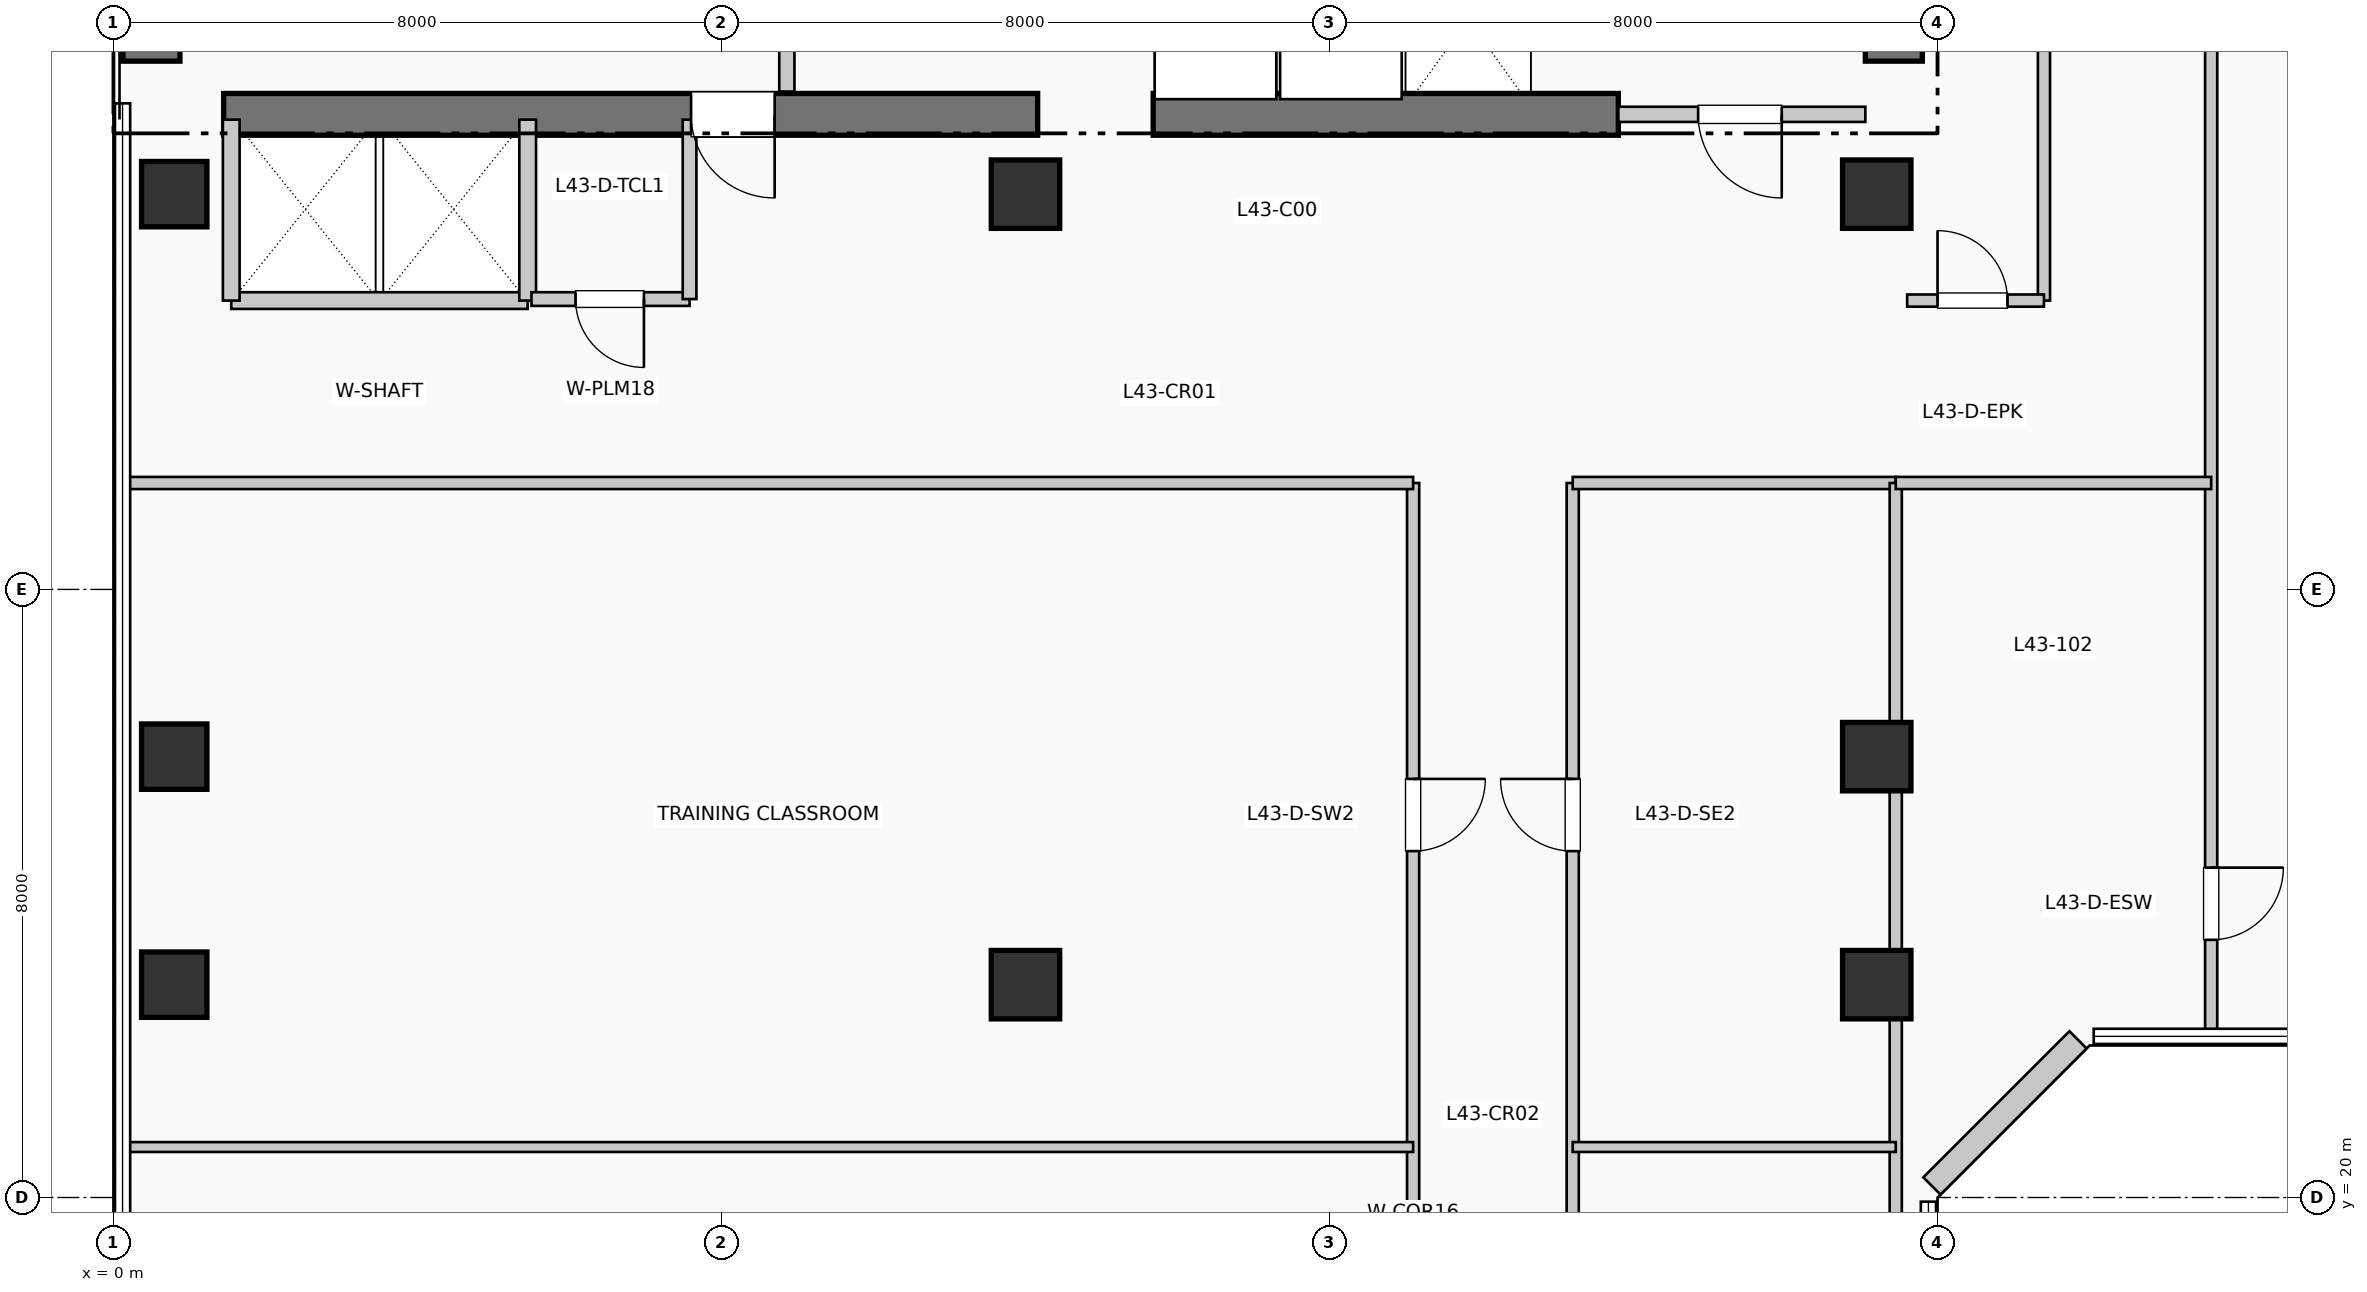
"""IFC4 building model, lengths in metres.
Left out: names, types, materials, properties, quantities, classifications, styles, units other than length and angle.
Written with IfcOpenShell. Run it as: python <this file> out.ifc"""

import sys

from ifc_helpers import new_model, si_unit, direction, frame, frame_2d, origin, origin_2d, place, context, subcontext, project, spatial, rectangle, extrude, element, fill, save


model = new_model("IFC4")
c1 = context("Model", 3, precision=1e-05, world=origin(), true_north=direction((0.0, 1.0)))
c2 = subcontext(c1, "Body", "Model", "MODEL_VIEW")
j1 = project(units=[si_unit("LENGTHUNIT", "METRE"), si_unit("PLANEANGLEUNIT", "RADIAN")], contexts=[c1])
p1 = place(None, origin())
s1 = spatial("IfcSite", under=j1, at=p1, CompositionType="ELEMENT")
p2 = place(p1, origin())
s2 = spatial("IfcBuilding", under=s1, at=p2, CompositionType="ELEMENT")
p3 = place(p2, frame((0.0, 0.0, 179.52)))
s3 = spatial("IfcBuildingStorey", under=s2, at=p3, CompositionType="ELEMENT", Elevation=179.52)
p4 = place(p3, frame((0.5, 34.95, 0.0), z_axis=(0.0, 0.0, 1.0), x_axis=(0.0, 1.0, 0.0)))
e1 = element("IfcWall", 1, at=p4, inside=s3, PredefinedType="SHEAR", context=c2, shape_type="SweptSolid", body=[
    extrude(rectangle(XDim=7.9, YDim=0.75, at=frame_2d((3.95, 0.0))), origin(), (0.0, 0.0, 1.0), 3.96),
])
p5 = place(p3, frame((23.425, 34.95, 0.0), z_axis=(0.0, 0.0, 1.0), x_axis=(0.0, 1.0, 0.0)))
e2 = element("IfcWall", 2, at=p5, inside=s3, PredefinedType="SHEAR", context=c2, shape_type="SweptSolid", body=[
    extrude(rectangle(XDim=10.64, YDim=0.75, at=frame_2d((5.32, 0.0))), origin(), (0.0, 0.0, 1.0), 3.96),
])
p6 = place(p3, frame((1.45, 34.25, 0.0), z_axis=(0.0, 0.0, 1.0), x_axis=(1.0, 0.0, 0.0)))
e3 = element("IfcWall", 3, at=p6, inside=s3, PredefinedType="SHEAR", context=c2, shape_type="SweptSolid", body=[
    extrude(rectangle(XDim=10.71, YDim=0.55, at=frame_2d((5.355, 0.0))), origin(), (0.0, 0.0, 1.0), 3.96),
])
p7 = place(p6, frame((7.25, 0.0, 0.0), z_axis=(0.0, 0.0, 1.0), x_axis=(-1.0, 0.0, 0.0)))
e4 = element("IfcOpeningElement", 4, at=p7, cuts=e3, PredefinedType="OPENING", context=c2, shape_type="SweptSolid", body=[
    extrude(rectangle(XDim=1.1, YDim=2.15, at=frame_2d((0.55, 1.075))), frame((0.0, 0.285, 0.0), z_axis=(0.0, -1.0, 0.0), x_axis=(1.0, 0.0, 0.0)), (0.0, 0.0, 1.0), 0.57),
])
p8 = place(p3, frame((13.68, 34.25, 0.0), z_axis=(0.0, 0.0, 1.0), x_axis=(1.0, 0.0, 0.0)))
e5 = element("IfcWall", 5, at=p8, inside=s3, PredefinedType="SHEAR", context=c2, shape_type="SweptSolid", body=[
    extrude(rectangle(XDim=6.12, YDim=0.55, at=frame_2d((3.06, 0.0))), origin(), (0.0, 0.0, 1.0), 3.96),
])
for number, where, z_axis, x_axis in (
    (6, (0.8, 22.8, 0.0), (0.0, 0.0, 1.0), (1.0, 0.0, 0.0)),
    (7, (0.8, 25.8, 0.0), (0.0, 0.0, 1.0), (1.0, 0.0, 0.0)),
    (8, (0.8, 33.2, 0.0), (0.0, 0.0, 1.0), (1.0, 0.0, 0.0)),
):
    element("IfcColumn", number, at=place(p3, frame(where, z_axis=z_axis, x_axis=x_axis)), inside=s3, PredefinedType="COLUMN", context=c2, shape_type="SweptSolid", body=[
        extrude(rectangle(XDim=0.86, YDim=0.86, at=origin_2d()), origin(), (0.0, 0.0, 1.0), 3.96),
    ])
for number, where, z_axis, x_axis in (
    (9, (12.0, 22.8, 0.0), (0.0, 0.0, 1.0), (1.0, 0.0, 0.0)),
    (10, (12.0, 33.2, 0.0), (0.0, 0.0, 1.0), (1.0, 0.0, 0.0)),
    (11, (23.2, 22.8, 0.0), (0.0, 0.0, 1.0), (1.0, 0.0, 0.0)),
    (12, (23.2, 25.8, 0.0), (0.0, 0.0, 1.0), (1.0, 0.0, 0.0)),
    (13, (23.2, 33.2, 0.0), (0.0, 0.0, 1.0), (1.0, 0.0, 0.0)),
):
    element("IfcColumn", number, at=place(p3, frame(where, z_axis=z_axis, x_axis=x_axis)), inside=s3, PredefinedType="COLUMN", context=c2, shape_type="SweptSolid", body=[
        extrude(rectangle(XDim=0.9, YDim=0.9, at=origin_2d()), origin(), (0.0, 0.0, 1.0), 3.96),
    ])
p9 = place(p3, frame((23.926, 20.152, 0.0), z_axis=(0.0, 0.0, 1.0), x_axis=(0.707106781187, 0.707106781187, 0.0)))
e14 = element("IfcWall", 14, at=p9, inside=s3, PredefinedType="SOLIDWALL", context=c2, shape_type="SweptSolid", body=[
    extrude(rectangle(XDim=2.718, YDim=0.32, at=frame_2d((1.359, 0.0))), origin(), (0.0, 0.0, 1.0), 3.71),
])
p10 = place(p3, frame((8.86, 34.55, 0.0), z_axis=(0.0, 0.0, 1.0), x_axis=(0.0, 1.0, 0.0)))
e15 = element("IfcWall", 15, at=p10, inside=s3, PredefinedType="PARTITIONING", context=c2, shape_type="SweptSolid", body=[
    extrude(rectangle(XDim=2.5, YDim=0.2, at=frame_2d((1.25, 0.0))), origin(), (0.0, 0.0, 1.0), 3.71),
])
p11 = place(p3, frame((19.8, 34.25, 0.0), z_axis=(0.0, 0.0, 1.0), x_axis=(1.0, 0.0, 0.0)))
e16 = element("IfcWall", 16, at=p11, inside=s3, PredefinedType="PARTITIONING", context=c2, shape_type="SweptSolid", body=[
    extrude(rectangle(XDim=3.25, YDim=0.2, at=frame_2d((1.625, 0.0))), origin(), (0.0, 0.0, 1.0), 3.71),
])
p12 = place(p11, frame((2.15, 0.0, 0.0), z_axis=(0.0, 0.0, 1.0), x_axis=(-1.0, 0.0, 0.0)))
e17 = element("IfcOpeningElement", 17, at=p12, cuts=e16, PredefinedType="OPENING", context=c2, shape_type="SweptSolid", body=[
    extrude(rectangle(XDim=1.1, YDim=2.15, at=frame_2d((0.55, 1.075))), frame((0.0, 0.11, 0.0), z_axis=(0.0, -1.0, 0.0), x_axis=(1.0, 0.0, 0.0)), (0.0, 0.0, 1.0), 0.22),
])
p13 = place(p3, frame((1.55, 31.8, 0.0), z_axis=(0.0, 0.0, 1.0), x_axis=(1.0, 0.0, 0.0)))
e18 = element("IfcWall", 18, at=p13, inside=s3, PredefinedType="PARTITIONING", context=c2, shape_type="SweptSolid", body=[
    extrude(rectangle(XDim=3.9, YDim=0.22, at=frame_2d((1.95, 0.0))), origin(), (0.0, 0.0, 1.0), 3.71),
])
for number, where, z_axis, x_axis in (
    (19, (1.55, 31.8, 0.0), (0.0, 0.0, 1.0), (0.0, 1.0, 0.0)),
    (20, (5.45, 31.8, 0.0), (0.0, 0.0, 1.0), (0.0, 1.0, 0.0)),
):
    element("IfcWall", number, at=place(p3, frame(where, z_axis=z_axis, x_axis=x_axis)), inside=s3, PredefinedType="PARTITIONING", context=c2, shape_type="SweptSolid", body=[
        extrude(rectangle(XDim=2.38, YDim=0.22, at=frame_2d((1.19, 0.0))), origin(), (0.0, 0.0, 1.0), 3.71),
    ])
p14 = place(p3, frame((5.5, 31.82, 0.0), z_axis=(0.0, 0.0, 1.0), x_axis=(1.0, 0.0, 0.0)))
e21 = element("IfcWall", 21, at=p14, inside=s3, PredefinedType="PLUMBINGWALL", context=c2, shape_type="SweptSolid", body=[
    extrude(rectangle(XDim=2.08, YDim=0.18, at=frame_2d((1.04, 0.0))), origin(), (0.0, 0.0, 1.0), 3.71),
])
p15 = place(p14, frame((1.48, 0.0, 0.0), z_axis=(0.0, 0.0, 1.0), x_axis=(-1.0, 0.0, 0.0)))
e22 = element("IfcOpeningElement", 22, at=p15, cuts=e21, PredefinedType="OPENING", context=c2, shape_type="SweptSolid", body=[
    extrude(rectangle(XDim=0.9, YDim=2.1, at=frame_2d((0.45, 1.05))), frame((0.0, 0.1, 0.0), z_axis=(0.0, -1.0, 0.0), x_axis=(1.0, 0.0, 0.0)), (0.0, 0.0, 1.0), 0.2),
])
p16 = place(p3, frame((7.58, 31.82, 0.0), z_axis=(0.0, 0.0, 1.0), x_axis=(0.0, 1.0, 0.0)))
e23 = element("IfcWall", 23, at=p16, inside=s3, PredefinedType="PLUMBINGWALL", context=c2, shape_type="SweptSolid", body=[
    extrude(rectangle(XDim=2.36, YDim=0.18, at=frame_2d((1.18, 0.0))), origin(), (0.0, 0.0, 1.0), 3.71),
])
p17 = place(p3, frame((17.1, 12.6, 0.0), z_axis=(0.0, 0.0, 1.0), x_axis=(0.0, 1.0, 0.0)))
e24 = element("IfcWall", 24, at=p17, inside=s3, PredefinedType="PARTITIONING", context=c2, shape_type="SweptSolid", body=[
    extrude(rectangle(XDim=16.8, YDim=0.16, at=frame_2d((8.4, 0.0))), origin(), (0.0, 0.0, 1.0), 3.71),
])
p18 = place(p17, frame((4.507, 0.0, 0.0), z_axis=(0.0, 0.0, 1.0), x_axis=(-1.0, 0.0, 0.0)))
e25 = element("IfcOpeningElement", 25, at=p18, cuts=e24, PredefinedType="OPENING", context=c2, shape_type="SweptSolid", body=[
    extrude(rectangle(XDim=0.95, YDim=2.15, at=frame_2d((0.475, 1.075))), frame((0.0, 0.09, 0.0), z_axis=(0.0, -1.0, 0.0), x_axis=(1.0, 0.0, 0.0)), (0.0, 0.0, 1.0), 0.18),
])
p19 = place(p17, frame((12.907, 0.0, 0.0), z_axis=(0.0, 0.0, 1.0), x_axis=(-1.0, 0.0, 0.0)))
e26 = element("IfcOpeningElement", 26, at=p19, cuts=e24, PredefinedType="OPENING", context=c2, shape_type="SweptSolid", body=[
    extrude(rectangle(XDim=0.95, YDim=2.15, at=frame_2d((0.475, 1.075))), frame((0.0, 0.09, 0.0), z_axis=(0.0, -1.0, 0.0), x_axis=(1.0, 0.0, 0.0)), (0.0, 0.0, 1.0), 0.18),
])
p20 = place(p3, frame((19.2, 12.6, 0.0), z_axis=(0.0, 0.0, 1.0), x_axis=(0.0, 1.0, 0.0)))
e27 = element("IfcWall", 27, at=p20, inside=s3, PredefinedType="PARTITIONING", context=c2, shape_type="SweptSolid", body=[
    extrude(rectangle(XDim=16.8, YDim=0.16, at=frame_2d((8.4, 0.0))), origin(), (0.0, 0.0, 1.0), 3.71),
])
p21 = place(p20, frame((3.557, 0.0, 0.0)))
e28 = element("IfcOpeningElement", 28, at=p21, cuts=e27, PredefinedType="OPENING", context=c2, shape_type="SweptSolid", body=[
    extrude(rectangle(XDim=0.95, YDim=2.15, at=frame_2d((0.475, 1.075))), frame((0.0, 0.09, 0.0), z_axis=(0.0, -1.0, 0.0), x_axis=(1.0, 0.0, 0.0)), (0.0, 0.0, 1.0), 0.18),
])
p22 = place(p20, frame((11.957, 0.0, 0.0)))
e29 = element("IfcOpeningElement", 29, at=p22, cuts=e27, PredefinedType="OPENING", context=c2, shape_type="SweptSolid", body=[
    extrude(rectangle(XDim=0.95, YDim=2.15, at=frame_2d((0.475, 1.075))), frame((0.0, 0.09, 0.0), z_axis=(0.0, -1.0, 0.0), x_axis=(1.0, 0.0, 0.0)), (0.0, 0.0, 1.0), 0.18),
])
p23 = place(p3, frame((0.19, 29.4, 0.0), z_axis=(0.0, 0.0, 1.0), x_axis=(1.0, 0.0, 0.0)))
e30 = element("IfcWall", 30, at=p23, inside=s3, PredefinedType="PARTITIONING", context=c2, shape_type="SweptSolid", body=[
    extrude(rectangle(XDim=16.91, YDim=0.16, at=frame_2d((8.455, 0.0))), origin(), (0.0, 0.0, 1.0), 3.365),
])
p24 = place(p3, frame((19.2, 29.4, 0.0), z_axis=(0.0, 0.0, 1.0), x_axis=(1.0, 0.0, 0.0)))
e31 = element("IfcWall", 31, at=p24, inside=s3, PredefinedType="PARTITIONING", context=c2, shape_type="SweptSolid", body=[
    extrude(rectangle(XDim=4.25, YDim=0.16, at=frame_2d((2.125, 0.0))), origin(), (0.0, 0.0, 1.0), 3.71),
])
p25 = place(p3, frame((23.45, 0.19, 0.0), z_axis=(0.0, 0.0, 1.0), x_axis=(0.0, 1.0, 0.0)))
e32 = element("IfcWall", 32, at=p25, inside=s3, PredefinedType="PARTITIONING", context=c2, shape_type="SweptSolid", body=[
    extrude(rectangle(XDim=29.21, YDim=0.16, at=frame_2d((14.605, 0.0))), origin(), (0.0, 0.0, 1.0), 3.045),
])
p26 = place(p3, frame((0.19, 20.664, 0.0), z_axis=(0.0, 0.0, 1.0), x_axis=(1.0, 0.0, 0.0)))
e33 = element("IfcWall", 33, at=p26, inside=s3, PredefinedType="PARTITIONING", context=c2, shape_type="SweptSolid", body=[
    extrude(rectangle(XDim=16.91, YDim=0.13, at=frame_2d((8.455, 0.0))), origin(), (0.0, 0.0, 1.0), 3.71),
])
p27 = place(p3, frame((19.2, 20.664, 0.0), z_axis=(0.0, 0.0, 1.0), x_axis=(1.0, 0.0, 0.0)))
e34 = element("IfcWall", 34, at=p27, inside=s3, PredefinedType="PARTITIONING", context=c2, shape_type="SweptSolid", body=[
    extrude(rectangle(XDim=4.25, YDim=0.13, at=frame_2d((2.125, 0.0))), origin(), (0.0, 0.0, 1.0), 3.71),
])
p28 = place(p3, frame((25.4, 31.8, 0.0), z_axis=(0.0, 0.0, 1.0), x_axis=(0.0, 1.0, 0.0)))
e35 = element("IfcWall", 35, at=p28, inside=s3, PredefinedType="PARTITIONING", context=c2, shape_type="SweptSolid", body=[
    extrude(rectangle(XDim=14.01, YDim=0.16, at=frame_2d((7.005, 0.0))), origin(), (0.0, 0.0, 1.0), 3.71),
])
p29 = place(p3, frame((27.6, 22.19, 0.0), z_axis=(0.0, 0.0, 1.0), x_axis=(0.0, 1.0, 0.0)))
e36 = element("IfcWall", 36, at=p29, inside=s3, PredefinedType="PARTITIONING", context=c2, shape_type="SweptSolid", body=[
    extrude(rectangle(XDim=15.01, YDim=0.16, at=frame_2d((7.505, 0.0))), origin(), (0.0, 0.0, 1.0), 3.71),
])
p30 = place(p29, frame((2.15, 0.0, 0.0), z_axis=(0.0, 0.0, 1.0), x_axis=(-1.0, 0.0, 0.0)))
e37 = element("IfcOpeningElement", 37, at=p30, cuts=e36, PredefinedType="OPENING", context=c2, shape_type="SweptSolid", body=[
    extrude(rectangle(XDim=0.95, YDim=2.15, at=frame_2d((0.475, 1.075))), frame((0.0, 0.09, 0.0), z_axis=(0.0, -1.0, 0.0), x_axis=(1.0, 0.0, 0.0)), (0.0, 0.0, 1.0), 0.18),
])
p31 = place(p3, frame((23.45, 29.4, 0.0), z_axis=(0.0, 0.0, 1.0), x_axis=(1.0, 0.0, 0.0)))
e38 = element("IfcWall", 38, at=p31, inside=s3, PredefinedType="PARTITIONING", context=c2, shape_type="SweptSolid", body=[
    extrude(rectangle(XDim=4.15, YDim=0.16, at=frame_2d((2.075, 0.0))), origin(), (0.0, 0.0, 1.0), 3.365),
])
p32 = place(p3, frame((23.6, 31.8, 0.0), z_axis=(0.0, 0.0, 1.0), x_axis=(1.0, 0.0, 0.0)))
e39 = element("IfcWall", 39, at=p32, inside=s3, PredefinedType="PARTITIONING", context=c2, shape_type="SweptSolid", body=[
    extrude(rectangle(XDim=1.8, YDim=0.16, at=frame_2d((0.9, 0.0))), origin(), (0.0, 0.0, 1.0), 3.71),
])
p33 = place(p32, frame((0.4, 0.0, 0.0)))
e40 = element("IfcOpeningElement", 40, at=p33, cuts=e39, PredefinedType="OPENING", context=c2, shape_type="SweptSolid", body=[
    extrude(rectangle(XDim=0.92, YDim=2.1, at=frame_2d((0.46, 1.05))), frame((0.0, 0.09, 0.0), z_axis=(0.0, -1.0, 0.0), x_axis=(1.0, 0.0, 0.0)), (0.0, 0.0, 1.0), 0.18),
])
p34 = place(p7, origin())
e41 = element("IfcDoor", 41, at=p34, inside=s3, OperationType="SINGLE_SWING_RIGHT", PredefinedType="DOOR", context=c2, shape_type="SweptSolid", body=[
    extrude(rectangle(XDim=1.1, YDim=2.15, at=frame_2d((0.55, 1.075))), frame((0.0, 0.025, 0.0), z_axis=(0.0, -1.0, 0.0), x_axis=(1.0, 0.0, 0.0)), (0.0, 0.0, 1.0), 0.05),
])
fill(e4, e41)
p35 = place(p12, origin())
e42 = element("IfcDoor", 42, at=p35, inside=s3, OperationType="SINGLE_SWING_RIGHT", PredefinedType="DOOR", context=c2, shape_type="SweptSolid", body=[
    extrude(rectangle(XDim=1.1, YDim=2.15, at=frame_2d((0.55, 1.075))), frame((0.0, 0.025, 0.0), z_axis=(0.0, -1.0, 0.0), x_axis=(1.0, 0.0, 0.0)), (0.0, 0.0, 1.0), 0.05),
])
fill(e17, e42)
p36 = place(p15, origin())
e43 = element("IfcDoor", 43, at=p36, inside=s3, OperationType="SINGLE_SWING_RIGHT", PredefinedType="DOOR", context=c2, shape_type="SweptSolid", body=[
    extrude(rectangle(XDim=0.9, YDim=2.1, at=frame_2d((0.45, 1.05))), frame((0.0, 0.025, 0.0), z_axis=(0.0, -1.0, 0.0), x_axis=(1.0, 0.0, 0.0)), (0.0, 0.0, 1.0), 0.05),
])
fill(e22, e43)
p37 = place(p19, origin())
e44 = element("IfcDoor", 44, at=p37, inside=s3, OperationType="SINGLE_SWING_RIGHT", PredefinedType="DOOR", context=c2, shape_type="SweptSolid", body=[
    extrude(rectangle(XDim=0.95, YDim=2.15, at=frame_2d((0.475, 1.075))), frame((0.0, 0.025, 0.0), z_axis=(0.0, -1.0, 0.0), x_axis=(1.0, 0.0, 0.0)), (0.0, 0.0, 1.0), 0.05),
])
fill(e26, e44)
p38 = place(p22, origin())
e45 = element("IfcDoor", 45, at=p38, inside=s3, OperationType="SINGLE_SWING_RIGHT", PredefinedType="DOOR", context=c2, shape_type="SweptSolid", body=[
    extrude(rectangle(XDim=0.95, YDim=2.15, at=frame_2d((0.475, 1.075))), frame((0.0, 0.025, 0.0), z_axis=(0.0, -1.0, 0.0), x_axis=(1.0, 0.0, 0.0)), (0.0, 0.0, 1.0), 0.05),
])
fill(e29, e45)
p39 = place(p33, origin())
e46 = element("IfcDoor", 46, at=p39, inside=s3, OperationType="SINGLE_SWING_LEFT", PredefinedType="DOOR", context=c2, shape_type="SweptSolid", body=[
    extrude(rectangle(XDim=0.92, YDim=2.1, at=frame_2d((0.46, 1.05))), frame((0.0, 0.025, 0.0), z_axis=(0.0, -1.0, 0.0), x_axis=(1.0, 0.0, 0.0)), (0.0, 0.0, 1.0), 0.05),
])
fill(e40, e46)
p40 = place(p30, origin())
e47 = element("IfcDoor", 47, at=p40, inside=s3, OperationType="SINGLE_SWING_RIGHT", PredefinedType="DOOR", context=c2, shape_type="SweptSolid", body=[
    extrude(rectangle(XDim=0.95, YDim=2.15, at=frame_2d((0.475, 1.075))), frame((0.0, 0.025, 0.0), z_axis=(0.0, -1.0, 0.0), x_axis=(1.0, 0.0, 0.0)), (0.0, 0.0, 1.0), 0.05),
])
fill(e37, e47)
save(model, sys.argv[1])
